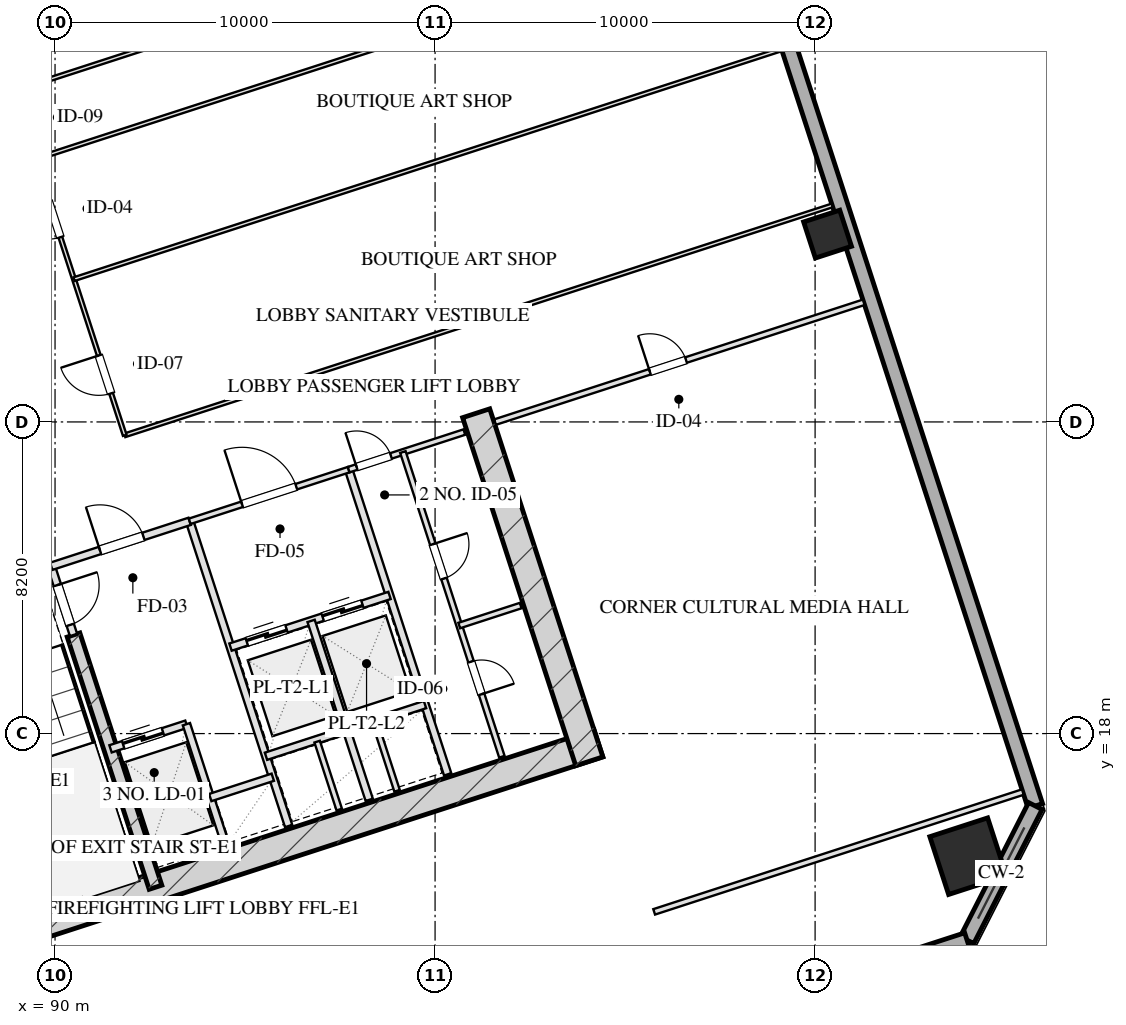
"""IFC4 building model, lengths in metres.
Left out: names, types, materials, properties, quantities, classifications, styles, units other than length and angle.
Written with IfcOpenShell. Run it as: python <this file> out.ifc"""

import sys

from ifc_helpers import new_model, si_unit, direction, frame, frame_2d, origin, origin_2d, place, context, subcontext, project, spatial, rectangle, hollow_rectangle, extrude, element, fill, save


model = new_model("IFC4")
c1 = context("Model", 3, precision=1e-05, world=origin(), true_north=direction((0.0, 1.0)))
c2 = subcontext(c1, "Body", "Model", "MODEL_VIEW")
j1 = project(units=[si_unit("LENGTHUNIT", "METRE"), si_unit("PLANEANGLEUNIT", "RADIAN")], contexts=[c1])
p1 = place(None, origin())
s1 = spatial("IfcSite", under=j1, at=p1, CompositionType="ELEMENT")
p2 = place(p1, origin())
s2 = spatial("IfcBuilding", under=s1, at=p2, CompositionType="ELEMENT")
p3 = place(p2, frame((0.0, 0.0, 74.75)))
s3 = spatial("IfcBuildingStorey", under=s2, at=p3, CompositionType="ELEMENT", Elevation=74.75)
p4 = place(p3, frame((88.559, 12.629, 0.0), z_axis=(0.0, 0.0, 1.0), x_axis=(0.951056072937, 0.309018358888, 0.0)))
e1 = element("IfcWall", 1, at=p4, inside=s3, PredefinedType="SHEAR", context=c2, shape_type="SweptSolid", body=[
    extrude(rectangle(XDim=16.55, YDim=0.75, at=frame_2d((8.275, 0.0))), origin(), (0.0, 0.0, 1.0), 3.45),
])
p5 = place(p3, frame((101.082, 26.429, 0.0), z_axis=(0.0, 0.0, 1.0), x_axis=(0.309016134813, -0.951056795583, 0.0)))
e2 = element("IfcWall", 2, at=p5, inside=s3, PredefinedType="SHEAR", context=c2, shape_type="SweptSolid", body=[
    extrude(rectangle(XDim=9.63, YDim=0.75, at=frame_2d((4.815, 0.0))), origin(), (0.0, 0.0, 1.0), 3.45),
])
p6 = place(p3, frame((90.486, 20.594, 0.0), z_axis=(0.0, 0.0, 1.0), x_axis=(0.309020428229, -0.951055400562, 0.0)))
e3 = element("IfcWall", 3, at=p6, inside=s3, PredefinedType="SHEAR", context=c2, shape_type="SweptSolid", body=[
    extrude(rectangle(XDim=6.98, YDim=0.35, at=frame_2d((3.49, 0.0))), origin(), (0.0, 0.0, 1.0), 3.45),
])
p7 = place(p3, frame((85.814, 21.074, 0.0), z_axis=(0.0, 0.0, 1.0), x_axis=(0.95106580992, 0.308988390074, 0.0)))
e4 = element("IfcWall", 4, at=p7, inside=s3, PredefinedType="SHEAR", context=c2, shape_type="SweptSolid", body=[
    extrude(rectangle(XDim=4.295, YDim=0.75, at=frame_2d((2.147, 0.0))), origin(), (0.0, 0.0, 1.0), 3.45),
])
p8 = place(p3, frame((114.027, 14.774, 0.0), z_axis=(0.0, 0.0, 1.0), x_axis=(0.951056516295, 0.309016994375, 0.0)))
e5 = element("IfcColumn", 5, at=p8, inside=s3, PredefinedType="COLUMN", context=c2, shape_type="SweptSolid", body=[
    extrude(hollow_rectangle(XDim=1.6, YDim=1.6, WallThickness=0.055, at=origin_2d()), origin(), (0.0, 0.0, 1.0), 3.451),
])
p9 = place(p3, frame((110.328, 31.142, 0.0), z_axis=(0.0, 0.0, 1.0), x_axis=(0.951056516295, 0.309016994375, 0.0)))
e6 = element("IfcColumn", 6, at=p9, inside=s3, PredefinedType="COLUMN", context=c2, shape_type="SweptSolid", body=[
    extrude(hollow_rectangle(XDim=1.0, YDim=1.0, WallThickness=0.036, at=origin_2d()), origin(), (0.0, 0.0, 1.0), 3.451),
])
p10 = place(p3, frame((100.345, 63.648, 0.0), z_axis=(0.0, 0.0, 1.0), x_axis=(0.309014526607, -0.951057318118, 0.0)))
e7 = element("IfcWall", 7, at=p10, inside=s3, PredefinedType="SOLIDWALL", context=c2, shape_type="SweptSolid", body=[
    extrude(rectangle(XDim=50.0, YDim=0.4, at=frame_2d((25.0, 0.0))), origin(), (0.0, 0.0, 1.0), 2.61),
])
p11 = place(p3, frame((115.795, 16.095, 0.0), z_axis=(0.0, 0.0, 1.0), x_axis=(-0.453958106755, -0.891023028497, 0.0)))
e8 = element("IfcWall", 8, at=p11, inside=s3, PredefinedType="SOLIDWALL", context=c2, shape_type="SweptSolid", body=[
    extrude(rectangle(XDim=3.96, YDim=0.4, at=frame_2d((1.98, 0.0))), origin(), (0.0, 0.0, 1.0), 2.61),
])
p12 = place(p3, frame((113.998, 12.567, 0.0), z_axis=(0.0, 0.0, 1.0), x_axis=(-0.951055939317, -0.309018770125, 0.0)))
e9 = element("IfcWall", 9, at=p12, inside=s3, PredefinedType="SOLIDWALL", context=c2, shape_type="SweptSolid", body=[
    extrude(rectangle(XDim=32.4, YDim=0.4, at=frame_2d((16.2, 0.0))), origin(), (0.0, 0.0, 1.0), 2.61),
])
p13 = place(p3, frame((89.899, 22.401, 0.0), z_axis=(0.0, 0.0, 1.0), x_axis=(0.308932062672, -0.951084108086, 0.0)))
e10 = element("IfcWall", 10, at=p13, inside=s3, PredefinedType="PARTITIONING", context=c2, shape_type="SweptSolid", body=[
    extrude(rectangle(XDim=1.9, YDim=0.2, at=frame_2d((0.95, 0.0))), origin(), (0.0, 0.0, 1.0), 3.175),
])
p14 = place(p13, frame((0.52, 0.0, 0.0)))
e11 = element("IfcOpeningElement", 11, at=p14, cuts=e10, PredefinedType="OPENING", context=c2, shape_type="SweptSolid", body=[
    extrude(rectangle(XDim=1.1, YDim=2.05, at=frame_2d((0.55, 1.025))), frame((0.0, 0.11, 0.0), z_axis=(0.0, -1.0, 0.0), x_axis=(1.0, 0.0, 0.0)), (0.0, 0.0, 1.0), 0.22),
])
p15 = place(p3, frame((93.542, 23.585, 0.0), z_axis=(0.0, 0.0, 1.0), x_axis=(0.309042196757, -0.951048327176, 0.0)))
e12 = element("IfcWall", 12, at=p15, inside=s3, PredefinedType="PARTITIONING", context=c2, shape_type="SweptSolid", body=[
    extrude(rectangle(XDim=8.43, YDim=0.2, at=frame_2d((4.215, 0.0))), origin(), (0.0, 0.0, 1.0), 3.175),
])
p16 = place(p3, frame((89.899, 22.401, 0.0), z_axis=(0.0, 0.0, 1.0), x_axis=(0.951046716504, 0.309047153403, 0.0)))
e13 = element("IfcWall", 13, at=p16, inside=s3, PredefinedType="PARTITIONING", context=c2, shape_type="SweptSolid", body=[
    extrude(rectangle(XDim=3.83, YDim=0.2, at=frame_2d((1.915, 0.0))), origin(), (0.0, 0.0, 1.0), 3.175),
])
p17 = place(p16, frame((1.35, 0.0, 0.0)))
e14 = element("IfcOpeningElement", 14, at=p17, cuts=e13, PredefinedType="OPENING", context=c2, shape_type="SweptSolid", body=[
    extrude(rectangle(XDim=1.2, YDim=2.05, at=frame_2d((0.6, 1.025))), frame((0.0, 0.11, 0.0), z_axis=(0.0, -1.0, 0.0), x_axis=(1.0, 0.0, 0.0)), (0.0, 0.0, 1.0), 0.22),
])
p18 = place(p3, frame((91.46, 17.598, 0.0), z_axis=(0.0, 0.0, 1.0), x_axis=(0.951062257173, 0.308999325213, 0.0)))
e15 = element("IfcWall", 15, at=p18, inside=s3, PredefinedType="PARTITIONING", context=c2, shape_type="SweptSolid", body=[
    extrude(rectangle(XDim=2.1, YDim=0.2, at=frame_2d((1.05, 0.0))), origin(), (0.0, 0.0, 1.0), 3.175),
])
p19 = place(p18, frame((0.35, 0.0, 0.0)))
e16 = element("IfcOpeningElement", 16, at=p19, cuts=e15, PredefinedType="OPENING", context=c2, shape_type="SweptSolid", body=[
    extrude(rectangle(XDim=1.1, YDim=2.05, at=frame_2d((0.55, 1.025))), frame((0.0, 0.11, 0.0), z_axis=(0.0, -1.0, 0.0), x_axis=(1.0, 0.0, 0.0)), (0.0, 0.0, 1.0), 0.22),
])
p20 = place(p3, frame((93.457, 18.247, 0.0), z_axis=(0.0, 0.0, 1.0), x_axis=(0.3089935693, -0.951064127245, 0.0)))
e17 = element("IfcWall", 17, at=p20, inside=s3, PredefinedType="PARTITIONING", context=c2, shape_type="SweptSolid", body=[
    extrude(rectangle(XDim=3.7, YDim=0.2, at=frame_2d((1.85, 0.0))), origin(), (0.0, 0.0, 1.0), 3.175),
])
p21 = place(p3, frame((94.084, 16.317, 0.0), z_axis=(0.0, 0.0, 1.0), x_axis=(0.951041328149, 0.309063734775, 0.0)))
e18 = element("IfcWall", 18, at=p21, inside=s3, PredefinedType="PARTITIONING", context=c2, shape_type="SweptSolid", body=[
    extrude(rectangle(XDim=1.73, YDim=0.2, at=frame_2d((0.865, 0.0))), origin(), (0.0, 0.0, 1.0), 3.175),
])
p22 = place(p3, frame((97.727, 24.944, 0.0), z_axis=(0.0, 0.0, 1.0), x_axis=(0.309016001439, -0.951056838919, 0.0)))
e19 = element("IfcWall", 19, at=p22, inside=s3, PredefinedType="PARTITIONING", context=c2, shape_type="SweptSolid", body=[
    extrude(rectangle(XDim=8.43, YDim=0.2, at=frame_2d((4.215, 0.0))), origin(), (0.0, 0.0, 1.0), 3.175),
])
p23 = place(p3, frame((93.542, 23.585, 0.0), z_axis=(0.0, 0.0, 1.0), x_axis=(0.951063829732, 0.308994485023, 0.0)))
e20 = element("IfcWall", 20, at=p23, inside=s3, PredefinedType="PARTITIONING", context=c2, shape_type="SweptSolid", body=[
    extrude(rectangle(XDim=4.4, YDim=0.15, at=frame_2d((2.2, 0.0))), origin(), (0.0, 0.0, 1.0), 3.175),
])
p24 = place(p23, frame((1.45, 0.0, 0.0)))
e21 = element("IfcOpeningElement", 21, at=p24, cuts=e20, PredefinedType="OPENING", context=c2, shape_type="SweptSolid", body=[
    extrude(rectangle(XDim=1.5, YDim=2.05, at=frame_2d((0.75, 1.025))), frame((0.0, 0.085, 0.0), z_axis=(0.0, -1.0, 0.0), x_axis=(1.0, 0.0, 0.0)), (0.0, 0.0, 1.0), 0.17),
])
p25 = place(p3, frame((94.617, 20.275, 0.0), z_axis=(0.0, 0.0, 1.0), x_axis=(0.951058531764, 0.30901079133, 0.0)))
e22 = element("IfcWall", 22, at=p25, inside=s3, PredefinedType="PARTITIONING", context=c2, shape_type="SweptSolid", body=[
    extrude(rectangle(XDim=4.4, YDim=0.2, at=frame_2d((2.2, 0.0))), origin(), (0.0, 0.0, 1.0), 3.175),
])
p26 = place(p25, frame((0.45, 0.0, 0.0)))
e23 = element("IfcOpeningElement", 23, at=p26, cuts=e22, PredefinedType="OPENING", context=c2, shape_type="SweptSolid", body=[
    extrude(rectangle(XDim=1.1, YDim=2.05, at=frame_2d((0.55, 1.025))), frame((0.0, 0.11, 0.0), z_axis=(0.0, -1.0, 0.0), x_axis=(1.0, 0.0, 0.0)), (0.0, 0.0, 1.0), 0.22),
])
p27 = place(p25, frame((2.55, 0.0, 0.0)))
e24 = element("IfcOpeningElement", 24, at=p27, cuts=e22, PredefinedType="OPENING", context=c2, shape_type="SweptSolid", body=[
    extrude(rectangle(XDim=1.1, YDim=2.05, at=frame_2d((0.55, 1.025))), frame((0.0, 0.11, 0.0), z_axis=(0.0, -1.0, 0.0), x_axis=(1.0, 0.0, 0.0)), (0.0, 0.0, 1.0), 0.22),
])
p28 = place(p3, frame((96.738, 20.964, 0.0), z_axis=(0.0, 0.0, 1.0), x_axis=(0.309042578481, -0.951048203135, 0.0)))
e25 = element("IfcWall", 25, at=p28, inside=s3, PredefinedType="PARTITIONING", context=c2, shape_type="SweptSolid", body=[
    extrude(rectangle(XDim=4.95, YDim=0.2, at=frame_2d((2.475, 0.0))), origin(), (0.0, 0.0, 1.0), 3.175),
])
p29 = place(p3, frame((95.551, 17.403, 0.0), z_axis=(0.0, 0.0, 1.0), x_axis=(0.951058531764, 0.30901079133, 0.0)))
e26 = element("IfcWall", 26, at=p29, inside=s3, PredefinedType="PARTITIONING", context=c2, shape_type="SweptSolid", body=[
    extrude(rectangle(XDim=4.4, YDim=0.2, at=frame_2d((2.2, 0.0))), origin(), (0.0, 0.0, 1.0), 3.175),
])
p30 = place(p3, frame((96.897, 17.788, 0.0), z_axis=(0.0, 0.0, 1.0), x_axis=(0.30897153969, -0.951071284217, 0.0)))
e27 = element("IfcWall", 27, at=p30, inside=s3, PredefinedType="PARTITIONING", context=c2, shape_type="SweptSolid", body=[
    extrude(rectangle(XDim=1.88, YDim=0.15, at=frame_2d((0.94, 0.0))), origin(), (0.0, 0.0, 1.0), 3.175),
])
p31 = place(p3, frame((98.419, 18.282, 0.0), z_axis=(0.0, 0.0, 1.0), x_axis=(0.308933380006, -0.951083680187, 0.0)))
e28 = element("IfcWall", 28, at=p31, inside=s3, PredefinedType="PARTITIONING", context=c2, shape_type="SweptSolid", body=[
    extrude(rectangle(XDim=1.88, YDim=0.15, at=frame_2d((0.94, 0.0))), origin(), (0.0, 0.0, 1.0), 3.175),
])
p32 = place(p3, frame((97.727, 24.944, 0.0), z_axis=(0.0, 0.0, 1.0), x_axis=(0.951036872128, 0.309077446369, 0.0)))
e29 = element("IfcWall", 29, at=p32, inside=s3, PredefinedType="PARTITIONING", context=c2, shape_type="SweptSolid", body=[
    extrude(rectangle(XDim=3.2, YDim=0.15, at=frame_2d((1.6, 0.0))), origin(), (0.0, 0.0, 1.0), 3.175),
])
p33 = place(p32, frame((0.22, 0.0, 0.0)))
e30 = element("IfcOpeningElement", 30, at=p33, cuts=e29, PredefinedType="OPENING", context=c2, shape_type="SweptSolid", body=[
    extrude(rectangle(XDim=0.95, YDim=2.05, at=frame_2d((0.475, 1.025))), frame((0.0, 0.085, 0.0), z_axis=(0.0, -1.0, 0.0), x_axis=(1.0, 0.0, 0.0)), (0.0, 0.0, 1.0), 0.17),
])
p34 = place(p3, frame((99.153, 25.408, 0.0), z_axis=(0.0, 0.0, 1.0), x_axis=(0.309016001439, -0.951056838919, 0.0)))
e31 = element("IfcWall", 31, at=p34, inside=s3, PredefinedType="PARTITIONING", context=c2, shape_type="SweptSolid", body=[
    extrude(rectangle(XDim=8.43, YDim=0.15, at=frame_2d((4.215, 0.0))), origin(), (0.0, 0.0, 1.0), 3.175),
])
p35 = place(p34, frame((2.55, 0.0, 0.0)))
e32 = element("IfcOpeningElement", 32, at=p35, cuts=e31, PredefinedType="OPENING", context=c2, shape_type="SweptSolid", body=[
    extrude(rectangle(XDim=0.95, YDim=2.05, at=frame_2d((0.475, 1.025))), frame((0.0, 0.085, 0.0), z_axis=(0.0, -1.0, 0.0), x_axis=(1.0, 0.0, 0.0)), (0.0, 0.0, 1.0), 0.17),
])
p36 = place(p34, frame((5.8, 0.0, 0.0)))
e33 = element("IfcOpeningElement", 33, at=p36, cuts=e31, PredefinedType="OPENING", context=c2, shape_type="SweptSolid", body=[
    extrude(rectangle(XDim=0.9, YDim=2.05, at=frame_2d((0.45, 1.025))), frame((0.0, 0.085, 0.0), z_axis=(0.0, -1.0, 0.0), x_axis=(1.0, 0.0, 0.0)), (0.0, 0.0, 1.0), 0.17),
])
p37 = place(p3, frame((100.636, 20.843, 0.0), z_axis=(0.0, 0.0, 1.0), x_axis=(0.951040401051, 0.309066587596, 0.0)))
e34 = element("IfcWall", 34, at=p37, inside=s3, PredefinedType="PARTITIONING", context=c2, shape_type="SweptSolid", body=[
    extrude(rectangle(XDim=1.7, YDim=0.15, at=frame_2d((0.85, 0.0))), origin(), (0.0, 0.0, 1.0), 3.175),
])
p38 = place(p3, frame((105.765, 13.309, 0.0), z_axis=(0.0, 0.0, 1.0), x_axis=(0.951054294345, 0.309023832749, 0.0)))
e35 = element("IfcWall", 35, at=p38, inside=s3, PredefinedType="PARTITIONING", context=c2, shape_type="SweptSolid", body=[
    extrude(rectangle(XDim=10.2, YDim=0.15, at=frame_2d((5.1, 0.0))), origin(), (0.0, 0.0, 1.0), 3.175),
])
p39 = place(p3, frame((101.578, 26.196, 0.0), z_axis=(0.0, 0.0, 1.0), x_axis=(0.951059043131, 0.309009217467, 0.0)))
e36 = element("IfcWall", 36, at=p39, inside=s3, PredefinedType="PARTITIONING", context=c2, shape_type="SweptSolid", body=[
    extrude(rectangle(XDim=10.2, YDim=0.15, at=frame_2d((5.1, 0.0))), origin(), (0.0, 0.0, 1.0), 2.15),
])
p40 = place(p39, frame((4.284, 0.0, 0.0)))
e37 = element("IfcOpeningElement", 37, at=p40, cuts=e36, PredefinedType="OPENING", context=c2, shape_type="SweptSolid", body=[
    extrude(rectangle(XDim=1.0, YDim=2.05, at=frame_2d((0.5, 1.025))), frame((0.0, 0.085, 0.0), z_axis=(0.0, -1.0, 0.0), x_axis=(1.0, 0.0, 0.0)), (0.0, 0.0, 1.0), 0.17),
])
p41 = place(p3, frame((91.834, 25.848, 0.0), z_axis=(0.0, 0.0, 1.0), x_axis=(0.951055605195, 0.309019798438, 0.0)))
e38 = element("IfcWall", 38, at=p41, inside=s3, PredefinedType="MOVABLE", context=c2, shape_type="SweptSolid", body=[
    extrude(rectangle(XDim=19.575, YDim=0.1, at=frame_2d((9.788, 0.0))), origin(), (0.0, 0.0, 1.0), 3.175),
])
p42 = place(p3, frame((91.834, 25.848, 0.0), z_axis=(0.0, 0.0, 1.0), x_axis=(-0.30901773025, 0.951056277195, 0.0)))
e39 = element("IfcWall", 39, at=p42, inside=s3, PredefinedType="MOVABLE", context=c2, shape_type="SweptSolid", body=[
    extrude(rectangle(XDim=16.64, YDim=0.1, at=frame_2d((8.32, 0.0))), origin(), (0.0, 0.0, 1.0), 3.175),
])
p43 = place(p42, frame((1.16, 0.0, 0.0)))
e40 = element("IfcOpeningElement", 40, at=p43, cuts=e39, PredefinedType="OPENING", context=c2, shape_type="SweptSolid", body=[
    extrude(rectangle(XDim=1.05, YDim=2.05, at=frame_2d((0.525, 1.025))), frame((0.0, 0.06, 0.0), z_axis=(0.0, -1.0, 0.0), x_axis=(1.0, 0.0, 0.0)), (0.0, 0.0, 1.0), 0.12),
])
p44 = place(p42, frame((5.48, 0.0, 0.0)))
e41 = element("IfcOpeningElement", 41, at=p44, cuts=e39, PredefinedType="OPENING", context=c2, shape_type="SweptSolid", body=[
    extrude(rectangle(XDim=1.0, YDim=2.05, at=frame_2d((0.5, 1.025))), frame((0.0, 0.06, 0.0), z_axis=(0.0, -1.0, 0.0), x_axis=(1.0, 0.0, 0.0)), (0.0, 0.0, 1.0), 0.12),
])
p45 = place(p42, frame((8.08, 0.0, 0.0)))
e42 = element("IfcOpeningElement", 42, at=p45, cuts=e39, PredefinedType="OPENING", context=c2, shape_type="SweptSolid", body=[
    extrude(rectangle(XDim=0.85, YDim=2.05, at=frame_2d((0.425, 1.025))), frame((0.0, 0.06, 0.0), z_axis=(0.0, -1.0, 0.0), x_axis=(1.0, 0.0, 0.0)), (0.0, 0.0, 1.0), 0.12),
])
p46 = place(p42, frame((10.874, 0.0, 0.0)))
e43 = element("IfcOpeningElement", 43, at=p46, cuts=e39, PredefinedType="OPENING", context=c2, shape_type="SweptSolid", body=[
    extrude(rectangle(XDim=1.0, YDim=2.05, at=frame_2d((0.5, 1.025))), frame((0.0, 0.06, 0.0), z_axis=(0.0, -1.0, 0.0), x_axis=(1.0, 0.0, 0.0)), (0.0, 0.0, 1.0), 0.12),
])
p47 = place(p42, frame((14.174, 0.0, 0.0)))
e44 = element("IfcOpeningElement", 44, at=p47, cuts=e39, PredefinedType="OPENING", context=c2, shape_type="SweptSolid", body=[
    extrude(rectangle(XDim=1.0, YDim=2.05, at=frame_2d((0.5, 1.025))), frame((0.0, 0.06, 0.0), z_axis=(0.0, -1.0, 0.0), x_axis=(1.0, 0.0, 0.0)), (0.0, 0.0, 1.0), 0.12),
])
for number, where, z_axis, x_axis in (
    (45, (90.499, 29.956, 0.0), (0.0, 0.0, 1.0), (0.951, 0.309, 0.0)),
    (46, (89.473, 33.114, 0.0), (0.0, 0.0, 1.0), (0.951, 0.309, 0.0)),
    (47, (88.892, 34.902, 0.0), (0.0, 0.0, 1.0), (0.951, 0.309, 0.0)),
):
    element("IfcWall", number, at=place(p3, frame(where, z_axis=z_axis, x_axis=x_axis)), inside=s3, PredefinedType="MOVABLE", context=c2, shape_type="SweptSolid", body=[
        extrude(rectangle(XDim=19.575, YDim=0.1, at=frame_2d((9.788, 0.0))), origin(), (0.0, 0.0, 1.0), 3.175),
    ])
p48 = place(p14, origin())
e48 = element("IfcDoor", 48, at=p48, inside=s3, OperationType="SINGLE_SWING_LEFT", PredefinedType="DOOR", context=c2, shape_type="SweptSolid", body=[
    extrude(rectangle(XDim=1.1, YDim=2.05, at=frame_2d((0.55, 1.025))), frame((0.0, 0.025, 0.0), z_axis=(0.0, -1.0, 0.0), x_axis=(1.0, 0.0, 0.0)), (0.0, 0.0, 1.0), 0.05),
])
fill(e11, e48)
p49 = place(p17, origin())
e49 = element("IfcDoor", 49, at=p49, inside=s3, OperationType="SINGLE_SWING_LEFT", PredefinedType="DOOR", context=c2, shape_type="SweptSolid", body=[
    extrude(rectangle(XDim=1.2, YDim=2.05, at=frame_2d((0.6, 1.025))), frame((0.0, 0.025, 0.0), z_axis=(0.0, -1.0, 0.0), x_axis=(1.0, 0.0, 0.0)), (0.0, 0.0, 1.0), 0.05),
])
fill(e14, e49)
p50 = place(p19, origin())
e50 = element("IfcDoor", 50, at=p50, inside=s3, OperationType="DOUBLE_DOOR_SLIDING", PredefinedType="DOOR", context=c2, shape_type="SweptSolid", body=[
    extrude(rectangle(XDim=1.1, YDim=2.05, at=frame_2d((0.55, 1.025))), frame((0.0, 0.025, 0.0), z_axis=(0.0, -1.0, 0.0), x_axis=(1.0, 0.0, 0.0)), (0.0, 0.0, 1.0), 0.05),
])
fill(e16, e50)
p51 = place(p24, origin())
e51 = element("IfcDoor", 51, at=p51, inside=s3, OperationType="SINGLE_SWING_LEFT", PredefinedType="DOOR", context=c2, shape_type="SweptSolid", body=[
    extrude(rectangle(XDim=1.5, YDim=2.05, at=frame_2d((0.75, 1.025))), frame((0.0, 0.025, 0.0), z_axis=(0.0, -1.0, 0.0), x_axis=(1.0, 0.0, 0.0)), (0.0, 0.0, 1.0), 0.05),
])
fill(e21, e51)
p52 = place(p26, origin())
e52 = element("IfcDoor", 52, at=p52, inside=s3, OperationType="DOUBLE_DOOR_SLIDING", PredefinedType="DOOR", context=c2, shape_type="SweptSolid", body=[
    extrude(rectangle(XDim=1.1, YDim=2.05, at=frame_2d((0.55, 1.025))), frame((0.0, 0.025, 0.0), z_axis=(0.0, -1.0, 0.0), x_axis=(1.0, 0.0, 0.0)), (0.0, 0.0, 1.0), 0.05),
])
fill(e23, e52)
p53 = place(p27, origin())
e53 = element("IfcDoor", 53, at=p53, inside=s3, OperationType="DOUBLE_DOOR_SLIDING", PredefinedType="DOOR", context=c2, shape_type="SweptSolid", body=[
    extrude(rectangle(XDim=1.1, YDim=2.05, at=frame_2d((0.55, 1.025))), frame((0.0, 0.025, 0.0), z_axis=(0.0, -1.0, 0.0), x_axis=(1.0, 0.0, 0.0)), (0.0, 0.0, 1.0), 0.05),
])
fill(e24, e53)
p54 = place(p33, origin())
e54 = element("IfcDoor", 54, at=p54, inside=s3, OperationType="SINGLE_SWING_LEFT", PredefinedType="DOOR", context=c2, shape_type="SweptSolid", body=[
    extrude(rectangle(XDim=0.95, YDim=2.05, at=frame_2d((0.475, 1.025))), frame((0.0, 0.025, 0.0), z_axis=(0.0, -1.0, 0.0), x_axis=(1.0, 0.0, 0.0)), (0.0, 0.0, 1.0), 0.05),
])
fill(e30, e54)
p55 = place(p35, origin())
e55 = element("IfcDoor", 55, at=p55, inside=s3, OperationType="SINGLE_SWING_LEFT", PredefinedType="DOOR", context=c2, shape_type="SweptSolid", body=[
    extrude(rectangle(XDim=0.95, YDim=2.05, at=frame_2d((0.475, 1.025))), frame((0.0, 0.025, 0.0), z_axis=(0.0, -1.0, 0.0), x_axis=(1.0, 0.0, 0.0)), (0.0, 0.0, 1.0), 0.05),
])
fill(e32, e55)
p56 = place(p36, origin())
e56 = element("IfcDoor", 56, at=p56, inside=s3, OperationType="SINGLE_SWING_RIGHT", PredefinedType="DOOR", context=c2, shape_type="SweptSolid", body=[
    extrude(rectangle(XDim=0.9, YDim=2.05, at=frame_2d((0.45, 1.025))), frame((0.0, 0.025, 0.0), z_axis=(0.0, -1.0, 0.0), x_axis=(1.0, 0.0, 0.0)), (0.0, 0.0, 1.0), 0.05),
])
fill(e33, e56)
p57 = place(p40, origin())
e57 = element("IfcDoor", 57, at=p57, inside=s3, OperationType="SINGLE_SWING_LEFT", PredefinedType="DOOR", context=c2, shape_type="SweptSolid", body=[
    extrude(rectangle(XDim=1.0, YDim=2.05, at=frame_2d((0.5, 1.025))), frame((0.0, 0.025, 0.0), z_axis=(0.0, -1.0, 0.0), x_axis=(1.0, 0.0, 0.0)), (0.0, 0.0, 1.0), 0.05),
])
fill(e37, e57)
p58 = place(p43, origin())
e58 = element("IfcDoor", 58, at=p58, inside=s3, OperationType="SINGLE_SWING_RIGHT", PredefinedType="DOOR", context=c2, shape_type="SweptSolid", body=[
    extrude(rectangle(XDim=1.05, YDim=2.05, at=frame_2d((0.525, 1.025))), frame((0.0, 0.025, 0.0), z_axis=(0.0, -1.0, 0.0), x_axis=(1.0, 0.0, 0.0)), (0.0, 0.0, 1.0), 0.05),
])
fill(e40, e58)
p59 = place(p44, origin())
e59 = element("IfcDoor", 59, at=p59, inside=s3, OperationType="SINGLE_SWING_RIGHT", PredefinedType="DOOR", context=c2, shape_type="SweptSolid", body=[
    extrude(rectangle(XDim=1.0, YDim=2.05, at=frame_2d((0.5, 1.025))), frame((0.0, 0.025, 0.0), z_axis=(0.0, -1.0, 0.0), x_axis=(1.0, 0.0, 0.0)), (0.0, 0.0, 1.0), 0.05),
])
fill(e41, e59)
save(model, sys.argv[1])
